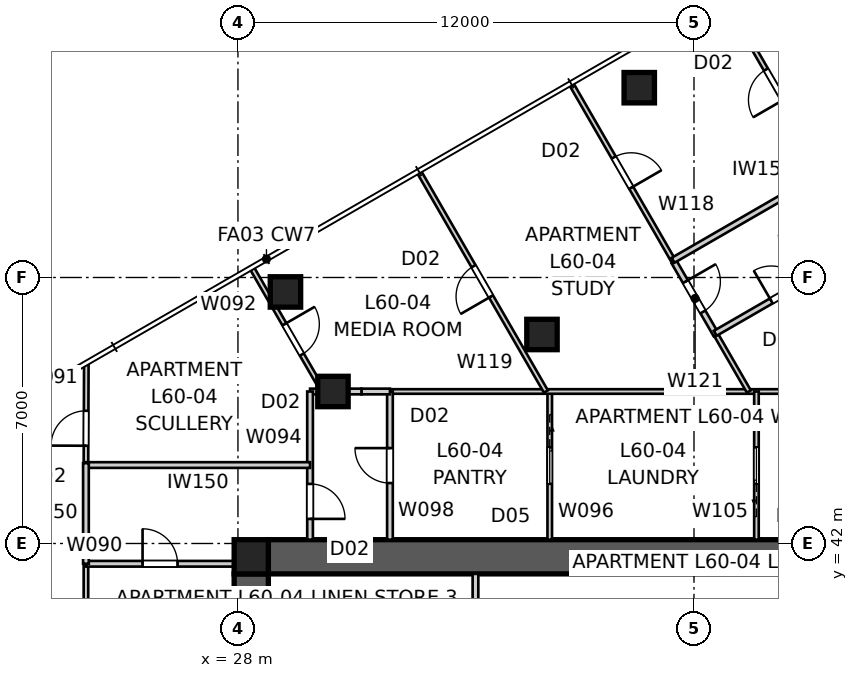
"""IFC4 building model, lengths in metres.
Left out: names, types, materials, properties, quantities, classifications, styles, units other than length and angle.
Written with IfcOpenShell. Run it as: python <this file> out.ifc"""

import sys

from ifc_helpers import new_model, si_unit, direction, frame, frame_2d, origin, origin_2d, place, context, subcontext, project, spatial, polyline, rectangle, outline, extrude, element, fill, save


model = new_model("IFC4")
c1 = context("Model", 3, precision=1e-05, world=origin(), true_north=direction((0.0, 1.0)))
c2 = subcontext(c1, "Body", "Model", "MODEL_VIEW")
j1 = project(units=[si_unit("LENGTHUNIT", "METRE"), si_unit("PLANEANGLEUNIT", "RADIAN")], contexts=[c1])
p1 = place(None, origin())
s1 = spatial("IfcSite", under=j1, at=p1, CompositionType="ELEMENT")
p2 = place(p1, origin())
s2 = spatial("IfcBuilding", under=s1, at=p2, CompositionType="ELEMENT")
p3 = place(p2, frame((0.0, 0.0, 218.4)))
s3 = spatial("IfcBuildingStorey", under=s2, at=p3, CompositionType="ELEMENT", Elevation=218.4)
p4 = place(p3, frame((28.8, 41.65, 0.0), z_axis=(0.0, 0.0, 1.0), x_axis=(1.0, 0.0, 0.0)))
e1 = element("IfcWall", 1, at=p4, inside=s3, PredefinedType="SHEAR", context=c2, shape_type="SweptSolid", body=[
    extrude(outline(polyline([(0.0, -0.45), (22.4, -0.45), (22.4, -0.025), (22.85, -0.025), (22.85, 0.025), (22.4, 0.025), (22.4, 0.45), (0.0, 0.45), (0.0, 0.025), (-0.45, 0.025), (-0.45, -0.025), (0.0, -0.025), (0.0, -0.45)])), origin(), (0.0, 0.0, 1.0), 3.4),
])
p5 = place(p3, frame((28.35, 41.2, 0.0), z_axis=(0.0, 0.0, 1.0), x_axis=(0.0, -1.0, 0.0)))
e2 = element("IfcWall", 2, at=p5, inside=s3, PredefinedType="SHEAR", context=c2, shape_type="SweptSolid", body=[
    extrude(outline(polyline([(0.0, -0.45), (22.4, -0.45), (22.4, -0.025), (22.85, -0.025), (22.85, 0.025), (22.4, 0.025), (22.4, 0.45), (0.0, 0.45), (0.0, 0.025), (-0.45, 0.025), (-0.45, -0.025), (0.0, -0.025), (0.0, -0.45)])), origin(), (0.0, 0.0, 1.0), 3.4),
])
p6 = place(p5, frame((11.14, 0.0, 0.0)))
e3 = element("IfcOpeningElement", 3, at=p6, cuts=e2, PredefinedType="OPENING", context=c2, shape_type="SweptSolid", body=[
    extrude(rectangle(XDim=1.02, YDim=2.4, at=frame_2d((0.51, 1.2))), frame((0.0, 0.46, 0.0), z_axis=(0.0, -1.0, 0.0), x_axis=(1.0, 0.0, 0.0)), (0.0, 0.0, 1.0), 0.92),
])
p7 = place(p3, frame((28.35, 41.65, 0.0), z_axis=(0.0, 0.0, 1.0), x_axis=(1.0, 0.0, 0.0)))
e4 = element("IfcColumn", 4, at=p7, inside=s3, PredefinedType="COLUMN", context=c2, shape_type="SweptSolid", body=[
    extrude(rectangle(XDim=0.9, YDim=0.9, at=origin_2d()), origin(), (0.0, 0.0, 1.0), 3.4),
])
for number, where, z_axis, x_axis in (
    (5, (38.56, 53.995, 0.0), (0.0, 0.0, 1.0), (1.0, 0.0, 0.0)),
    (6, (29.25, 48.62, 0.0), (0.0, 0.0, 1.0), (1.0, 0.0, 0.0)),
    (7, (36.0, 47.5, 0.0), (0.0, 0.0, 1.0), (1.0, 0.0, 0.0)),
    (8, (30.5, 46.0, 0.0), (0.0, 0.0, 1.0), (1.0, 0.0, 0.0)),
):
    element("IfcColumn", number, at=place(p3, frame(where, z_axis=z_axis, x_axis=x_axis)), inside=s3, PredefinedType="COLUMN", context=c2, shape_type="SweptSolid", body=[
        extrude(rectangle(XDim=0.8, YDim=0.8, at=origin_2d()), origin(), (0.0, 0.0, 1.0), 3.4),
    ])
p8 = place(p3, frame((34.25, 41.2, 0.0), z_axis=(0.0, 0.0, 1.0), x_axis=(0.0, -1.0, 0.0)))
e9 = element("IfcWall", 9, at=p8, inside=s3, PredefinedType="SOLIDWALL", context=c2, shape_type="SweptSolid", body=[
    extrude(rectangle(XDim=5.95, YDim=0.15, at=frame_2d((2.975, 0.0))), origin(), (0.0, 0.0, 1.0), 3.25),
])
p9 = place(p8, frame((2.515, 0.0, 0.0)))
e10 = element("IfcOpeningElement", 10, at=p9, cuts=e9, PredefinedType="OPENING", context=c2, shape_type="SweptSolid", body=[
    extrude(rectangle(XDim=0.92, YDim=2.1, at=frame_2d((0.46, 1.05))), frame((0.0, 0.085, 0.0), z_axis=(0.0, -1.0, 0.0), x_axis=(1.0, 0.0, 0.0)), (0.0, 0.0, 1.0), 0.17),
])
p10 = place(p3, frame((24.0, 15.422, 0.0), z_axis=(0.0, 0.0, 1.0), x_axis=(0.0, 1.0, 0.0)))
e11 = element("IfcWall", 11, at=p10, inside=s3, PredefinedType="PARTITIONING", context=c2, shape_type="SweptSolid", body=[
    extrude(rectangle(XDim=26.045, YDim=0.12, at=frame_2d((13.022, 0.0))), origin(), (0.0, 0.0, 1.0), 2.55),
])
p11 = place(p10, frame((13.139, 0.0, 0.0)))
e12 = element("IfcOpeningElement", 12, at=p11, cuts=e11, PredefinedType="OPENING", context=c2, shape_type="SweptSolid", body=[
    extrude(rectangle(XDim=0.92, YDim=2.34, at=frame_2d((0.46, 1.17))), frame((0.0, 0.07, 0.0), z_axis=(0.0, -1.0, 0.0), x_axis=(1.0, 0.0, 0.0)), (0.0, 0.0, 1.0), 0.14),
])
p12 = place(p10, frame((20.573, 0.0, 0.0)))
e13 = element("IfcOpeningElement", 13, at=p12, cuts=e11, PredefinedType="OPENING", context=c2, shape_type="SweptSolid", body=[
    extrude(rectangle(XDim=0.92, YDim=2.34, at=frame_2d((0.46, 1.17))), frame((0.0, 0.07, 0.0), z_axis=(0.0, -1.0, 0.0), x_axis=(1.0, 0.0, 0.0)), (0.0, 0.0, 1.0), 0.14),
])
p13 = place(p10, frame((0.42, 0.0, 0.0)))
e14 = element("IfcOpeningElement", 14, at=p13, cuts=e11, PredefinedType="OPENING", context=c2, shape_type="SweptSolid", body=[
    extrude(rectangle(XDim=0.92, YDim=2.34, at=frame_2d((0.46, 1.17))), frame((0.0, 0.07, 0.0), z_axis=(0.0, -1.0, 0.0), x_axis=(1.0, 0.0, 0.0)), (0.0, 0.0, 1.0), 0.14),
])
p14 = place(p3, frame((24.0, 41.467, 0.0), z_axis=(0.0, 0.0, 1.0), x_axis=(1.0, 0.0, 0.0)))
e15 = element("IfcWall", 15, at=p14, inside=s3, PredefinedType="SOLIDWALL", context=c2, shape_type="SweptSolid", body=[
    extrude(rectangle(XDim=4.82, YDim=0.15, at=frame_2d((2.41, 0.0))), origin(), (0.0, 0.0, 1.0), 3.25),
])
p15 = place(p14, frame((1.49, 0.0, 0.0)))
e16 = element("IfcOpeningElement", 16, at=p15, cuts=e15, PredefinedType="OPENING", context=c2, shape_type="SweptSolid", body=[
    extrude(rectangle(XDim=0.92, YDim=2.1, at=frame_2d((0.46, 1.05))), frame((0.0, 0.085, 0.0), z_axis=(0.0, -1.0, 0.0), x_axis=(1.0, 0.0, 0.0)), (0.0, 0.0, 1.0), 0.17),
])
p16 = place(p3, frame((24.0, 44.115, 0.0), z_axis=(0.0, 0.0, 1.0), x_axis=(0.003773202081, 0.999992881448, 0.0)))
e17 = element("IfcWall", 17, at=p16, inside=s3, PredefinedType="PARTITIONING", context=c2, shape_type="SweptSolid", body=[
    extrude(rectangle(XDim=2.588, YDim=0.12, at=frame_2d((1.294, 0.0))), origin(), (0.0, 0.0, 1.0), 3.25),
])
p17 = place(p16, frame((0.458, 0.0, 0.0)))
e18 = element("IfcOpeningElement", 18, at=p17, cuts=e17, PredefinedType="OPENING", context=c2, shape_type="SweptSolid", body=[
    extrude(rectangle(XDim=0.92, YDim=2.34, at=frame_2d((0.46, 1.17))), frame((0.0, 0.07, 0.0), z_axis=(0.0, -1.0, 0.0), x_axis=(1.0, 0.0, 0.0)), (0.0, 0.0, 1.0), 0.14),
])
p18 = place(p3, frame((28.38, 49.226, 0.0), z_axis=(0.0, 0.0, 1.0), x_axis=(0.499973989716, -0.866040420308, 0.0)))
e19 = element("IfcWall", 19, at=p18, inside=s3, PredefinedType="PARTITIONING", context=c2, shape_type="SweptSolid", body=[
    extrude(rectangle(XDim=3.725, YDim=0.12, at=frame_2d((1.862, 0.0))), origin(), (0.0, 0.0, 1.0), 3.25),
])
p19 = place(p18, frame((1.682, 0.0, 0.0)))
e20 = element("IfcOpeningElement", 20, at=p19, cuts=e19, PredefinedType="OPENING", context=c2, shape_type="SweptSolid", body=[
    extrude(rectangle(XDim=0.92, YDim=2.34, at=frame_2d((0.46, 1.17))), frame((0.0, 0.07, 0.0), z_axis=(0.0, -1.0, 0.0), x_axis=(1.0, 0.0, 0.0)), (0.0, 0.0, 1.0), 0.14),
])
p20 = place(p3, frame((30.633, 46.0, 0.0), z_axis=(0.0, 0.0, 1.0), x_axis=(-1.0, 0.0, 0.0)))
e21 = element("IfcWall", 21, at=p20, inside=s3, PredefinedType="SOLIDWALL", context=c2, shape_type="SweptSolid", body=[
    extrude(rectangle(XDim=0.735, YDim=0.15, at=frame_2d((0.368, 0.0))), origin(), (0.0, 0.0, 1.0), 3.25),
])
p21 = place(p3, frame((29.897, 46.0, 0.0), z_axis=(0.0, 0.0, 1.0), x_axis=(0.0, -1.0, 0.0)))
e22 = element("IfcWall", 22, at=p21, inside=s3, PredefinedType="SOLIDWALL", context=c2, shape_type="SweptSolid", body=[
    extrude(rectangle(XDim=3.9, YDim=0.15, at=frame_2d((1.95, 0.0))), origin(), (0.0, 0.0, 1.0), 3.25),
])
p22 = place(p21, frame((2.433, 0.0, 0.0)))
e23 = element("IfcOpeningElement", 23, at=p22, cuts=e22, PredefinedType="OPENING", context=c2, shape_type="SweptSolid", body=[
    extrude(rectangle(XDim=0.92, YDim=2.34, at=frame_2d((0.46, 1.17))), frame((0.0, 0.085, 0.0), z_axis=(0.0, -1.0, 0.0), x_axis=(1.0, 0.0, 0.0)), (0.0, 0.0, 1.0), 0.17),
])
p23 = place(p3, frame((29.897, 44.065, 0.0), z_axis=(0.0, 0.0, 1.0), x_axis=(-1.0, 0.0, 0.0)))
e24 = element("IfcWall", 24, at=p23, inside=s3, PredefinedType="SOLIDWALL", context=c2, shape_type="SweptSolid", body=[
    extrude(rectangle(XDim=5.897, YDim=0.15, at=frame_2d((2.949, 0.0))), origin(), (0.0, 0.0, 1.0), 3.25),
])
p24 = place(p3, frame((36.204, 46.0, 0.0), z_axis=(0.0, 0.0, 1.0), x_axis=(0.0, -1.0, 0.0)))
e25 = element("IfcWall", 25, at=p24, inside=s3, PredefinedType="PARTITIONING", context=c2, shape_type="SweptSolid", body=[
    extrude(rectangle(XDim=3.9, YDim=0.12, at=frame_2d((1.95, 0.0))), origin(), (0.0, 0.0, 1.0), 3.25),
])
p25 = place(p24, frame((1.47, 0.0, 0.0)))
e26 = element("IfcOpeningElement", 26, at=p25, cuts=e25, PredefinedType="OPENING", context=c2, shape_type="SweptSolid", body=[
    extrude(rectangle(XDim=0.96, YDim=2.1, at=frame_2d((0.48, 1.05))), frame((0.0, 0.07, 0.0), z_axis=(0.0, -1.0, 0.0), x_axis=(1.0, 0.0, 0.0)), (0.0, 0.0, 1.0), 0.14),
])
p26 = place(p3, frame((32.0, 46.0, 0.0), z_axis=(0.0, 0.0, 1.0), x_axis=(1.0, 0.0, 0.0)))
e27 = element("IfcWall", 27, at=p26, inside=s3, PredefinedType="PARTITIONING", context=c2, shape_type="SweptSolid", body=[
    extrude(rectangle(XDim=17.213, YDim=0.12, at=frame_2d((8.607, 0.0))), origin(), (0.0, 0.0, 1.0), 3.25),
])
p27 = place(p3, frame((32.0, 42.1, 0.0), z_axis=(0.0, 0.0, 1.0), x_axis=(0.0, 1.0, 0.0)))
e28 = element("IfcWall", 28, at=p27, inside=s3, PredefinedType="SOLIDWALL", context=c2, shape_type="SweptSolid", body=[
    extrude(rectangle(XDim=3.9, YDim=0.15, at=frame_2d((1.95, 0.0))), origin(), (0.0, 0.0, 1.0), 3.25),
])
p28 = place(p27, frame((1.49, 0.0, 0.0)))
e29 = element("IfcOpeningElement", 29, at=p28, cuts=e28, PredefinedType="OPENING", context=c2, shape_type="SweptSolid", body=[
    extrude(rectangle(XDim=0.92, YDim=2.34, at=frame_2d((0.46, 1.17))), frame((0.0, 0.085, 0.0), z_axis=(0.0, -1.0, 0.0), x_axis=(1.0, 0.0, 0.0)), (0.0, 0.0, 1.0), 0.17),
])
p29 = place(p3, frame((41.644, 42.1, 0.0), z_axis=(0.0, 0.0, 1.0), x_axis=(0.0, 1.0, 0.0)))
e30 = element("IfcWall", 30, at=p29, inside=s3, PredefinedType="PARTITIONING", context=c2, shape_type="SweptSolid", body=[
    extrude(rectangle(XDim=3.9, YDim=0.12, at=frame_2d((1.95, 0.0))), origin(), (0.0, 0.0, 1.0), 3.25),
])
p30 = place(p29, frame((1.47, 0.0, 0.0)))
e31 = element("IfcOpeningElement", 31, at=p30, cuts=e30, PredefinedType="OPENING", context=c2, shape_type="SweptSolid", body=[
    extrude(rectangle(XDim=0.96, YDim=2.1, at=frame_2d((0.48, 1.05))), frame((0.0, 0.07, 0.0), z_axis=(0.0, -1.0, 0.0), x_axis=(1.0, 0.0, 0.0)), (0.0, 0.0, 1.0), 0.14),
])
p31 = place(p3, frame((24.0, 44.115, 0.0), z_axis=(0.0, 0.0, 1.0), x_axis=(0.0, -1.0, 0.0)))
e32 = element("IfcWall", 32, at=p31, inside=s3, PredefinedType="SOLIDWALL", context=c2, shape_type="SweptSolid", body=[
    extrude(rectangle(XDim=2.648, YDim=0.15, at=frame_2d((1.324, 0.0))), origin(), (0.0, 0.0, 1.0), 3.25),
])
p32 = place(p3, frame((43.48, 51.722, 0.0), z_axis=(0.0, 0.0, 1.0), x_axis=(-0.499989180974, 0.866031650062, 0.0)))
e33 = element("IfcWall", 33, at=p32, inside=s3, PredefinedType="PARTITIONING", context=c2, shape_type="SweptSolid", body=[
    extrude(rectangle(XDim=5.388, YDim=0.12, at=frame_2d((2.694, 0.0))), origin(), (0.0, 0.0, 1.0), 3.25),
])
p33 = place(p32, frame((2.254, 0.0, 0.0)))
e34 = element("IfcOpeningElement", 34, at=p33, cuts=e33, PredefinedType="OPENING", context=c2, shape_type="SweptSolid", body=[
    extrude(rectangle(XDim=0.92, YDim=2.34, at=frame_2d((0.46, 1.17))), frame((0.0, 0.07, 0.0), z_axis=(0.0, -1.0, 0.0), x_axis=(1.0, 0.0, 0.0)), (0.0, 0.0, 1.0), 0.14),
])
p34 = place(p3, frame((36.781, 54.076, 0.0), z_axis=(0.0, 0.0, 1.0), x_axis=(0.499989180974, -0.866031650062, 0.0)))
e35 = element("IfcWall", 35, at=p34, inside=s3, PredefinedType="PARTITIONING", context=c2, shape_type="SweptSolid", body=[
    extrude(rectangle(XDim=5.388, YDim=0.12, at=frame_2d((2.694, 0.0))), origin(), (0.0, 0.0, 1.0), 3.25),
])
p35 = place(p34, frame((2.214, 0.0, 0.0)))
e36 = element("IfcOpeningElement", 36, at=p35, cuts=e35, PredefinedType="OPENING", context=c2, shape_type="SweptSolid", body=[
    extrude(rectangle(XDim=0.92, YDim=2.34, at=frame_2d((0.46, 1.17))), frame((0.0, 0.07, 0.0), z_axis=(0.0, -1.0, 0.0), x_axis=(1.0, 0.0, 0.0)), (0.0, 0.0, 1.0), 0.14),
])
p36 = place(p3, frame((36.103, 46.0, 0.0), z_axis=(0.0, 0.0, 1.0), x_axis=(-0.500013541994, 0.866017585169, 0.0)))
e37 = element("IfcWall", 37, at=p36, inside=s3, PredefinedType="PARTITIONING", context=c2, shape_type="SweptSolid", body=[
    extrude(rectangle(XDim=6.655, YDim=0.12, at=frame_2d((3.328, 0.0))), origin(), (0.0, 0.0, 1.0), 3.25),
])
p37 = place(p36, frame((2.887, 0.0, 0.0)))
e38 = element("IfcOpeningElement", 38, at=p37, cuts=e37, PredefinedType="OPENING", context=c2, shape_type="SweptSolid", body=[
    extrude(rectangle(XDim=0.92, YDim=2.34, at=frame_2d((0.46, 1.17))), frame((0.0, 0.07, 0.0), z_axis=(0.0, -1.0, 0.0), x_axis=(1.0, 0.0, 0.0)), (0.0, 0.0, 1.0), 0.14),
])
p38 = place(p3, frame((40.584, 47.488, 0.0), z_axis=(0.0, 0.0, 1.0), x_axis=(0.500005339912, -0.866022320763, 0.0)))
e39 = element("IfcWall", 39, at=p38, inside=s3, PredefinedType="PARTITIONING", context=c2, shape_type="SweptSolid", body=[
    extrude(rectangle(XDim=1.718, YDim=0.12, at=frame_2d((0.859, 0.0))), origin(), (0.0, 0.0, 1.0), 3.25),
])
p39 = place(p3, frame((39.475, 49.41, 0.0), z_axis=(0.0, 0.0, 1.0), x_axis=(0.500008142102, -0.866020702889, 0.0)))
e40 = element("IfcWall", 40, at=p39, inside=s3, PredefinedType="SOLIDWALL", context=c2, shape_type="SweptSolid", body=[
    extrude(rectangle(XDim=2.219, YDim=0.15, at=frame_2d((1.11, 0.0))), origin(), (0.0, 0.0, 1.0), 3.25),
])
p40 = place(p39, frame((0.6, 0.0, 0.0)))
e41 = element("IfcOpeningElement", 41, at=p40, cuts=e40, PredefinedType="OPENING", context=c2, shape_type="SweptSolid", body=[
    extrude(rectangle(XDim=0.92, YDim=2.34, at=frame_2d((0.46, 1.17))), frame((0.0, 0.085, 0.0), z_axis=(0.0, -1.0, 0.0), x_axis=(1.0, 0.0, 0.0)), (0.0, 0.0, 1.0), 0.17),
])
p41 = place(p3, frame((43.455, 51.766, 0.0), z_axis=(0.0, 0.0, 1.0), x_axis=(-0.866025598446, -0.499999662836, 0.0)))
e42 = element("IfcWall", 42, at=p41, inside=s3, PredefinedType="SOLIDWALL", context=c2, shape_type="SweptSolid", body=[
    extrude(rectangle(XDim=4.625, YDim=0.15, at=frame_2d((2.312, 0.0))), origin(), (0.0, 0.0, 1.0), 3.25),
])
p42 = place(p3, frame((32.0, 46.0, 0.0), z_axis=(0.0, 0.0, 1.0), x_axis=(-1.0, 0.0, 0.0)))
e43 = element("IfcWall", 43, at=p42, inside=s3, PredefinedType="SOLIDWALL", context=c2, shape_type="SweptSolid", body=[
    extrude(rectangle(XDim=0.75, YDim=0.15, at=frame_2d((0.375, 0.0))), origin(), (0.0, 0.0, 1.0), 3.25),
])
p43 = place(p3, frame((31.25, 46.0, 0.0), z_axis=(0.0, 0.0, 1.0), x_axis=(-1.0, 0.0, 0.0)))
e44 = element("IfcWall", 44, at=p43, inside=s3, PredefinedType="SOLIDWALL", context=c2, shape_type="SweptSolid", body=[
    extrude(rectangle(XDim=0.545, YDim=0.15, at=frame_2d((0.273, 0.0))), origin(), (0.0, 0.0, 1.0), 2.55),
])
p44 = place(p3, frame((40.559, 47.531, 0.0), z_axis=(0.0, 0.0, 1.0), x_axis=(0.866025598446, 0.499999662836, 0.0)))
e45 = element("IfcWall", 45, at=p44, inside=s3, PredefinedType="SOLIDWALL", context=c2, shape_type="SweptSolid", body=[
    extrude(rectangle(XDim=4.625, YDim=0.15, at=frame_2d((2.312, 0.0))), origin(), (0.0, 0.0, 1.0), 3.25),
])
p45 = place(p44, frame((1.702, 0.0, 0.0)))
e46 = element("IfcOpeningElement", 46, at=p45, cuts=e45, PredefinedType="OPENING", context=c2, shape_type="SweptSolid", body=[
    extrude(rectangle(XDim=0.92, YDim=2.34, at=frame_2d((0.46, 1.17))), frame((0.0, 0.085, 0.0), z_axis=(0.0, -1.0, 0.0), x_axis=(1.0, 0.0, 0.0)), (0.0, 0.0, 1.0), 0.17),
])
p46 = place(p15, origin())
e47 = element("IfcDoor", 47, at=p46, inside=s3, OperationType="SINGLE_SWING_LEFT", PredefinedType="DOOR", context=c2, shape_type="SweptSolid", body=[
    extrude(rectangle(XDim=0.92, YDim=2.1, at=frame_2d((0.46, 1.05))), frame((0.0, 0.025, 0.0), z_axis=(0.0, -1.0, 0.0), x_axis=(1.0, 0.0, 0.0)), (0.0, 0.0, 1.0), 0.05),
])
fill(e16, e47)
p47 = place(p17, origin())
e48 = element("IfcDoor", 48, at=p47, inside=s3, OperationType="SINGLE_SWING_LEFT", PredefinedType="DOOR", context=c2, shape_type="SweptSolid", body=[
    extrude(rectangle(XDim=0.92, YDim=2.34, at=frame_2d((0.46, 1.17))), frame((0.0, 0.025, 0.0), z_axis=(0.0, -1.0, 0.0), x_axis=(1.0, 0.0, 0.0)), (0.0, 0.0, 1.0), 0.05),
])
fill(e18, e48)
p48 = place(p22, origin())
e49 = element("IfcDoor", 49, at=p48, inside=s3, OperationType="SINGLE_SWING_RIGHT", PredefinedType="DOOR", context=c2, shape_type="SweptSolid", body=[
    extrude(rectangle(XDim=0.92, YDim=2.34, at=frame_2d((0.46, 1.17))), frame((0.0, 0.025, 0.0), z_axis=(0.0, -1.0, 0.0), x_axis=(1.0, 0.0, 0.0)), (0.0, 0.0, 1.0), 0.05),
])
fill(e23, e49)
p49 = place(p19, origin())
e50 = element("IfcDoor", 50, at=p49, inside=s3, OperationType="SINGLE_SWING_LEFT", PredefinedType="DOOR", context=c2, shape_type="SweptSolid", body=[
    extrude(rectangle(XDim=0.92, YDim=2.34, at=frame_2d((0.46, 1.17))), frame((0.0, 0.025, 0.0), z_axis=(0.0, -1.0, 0.0), x_axis=(1.0, 0.0, 0.0)), (0.0, 0.0, 1.0), 0.05),
])
fill(e20, e50)
p50 = place(p28, origin())
e51 = element("IfcDoor", 51, at=p50, inside=s3, OperationType="SINGLE_SWING_RIGHT", PredefinedType="DOOR", context=c2, shape_type="SweptSolid", body=[
    extrude(rectangle(XDim=0.92, YDim=2.34, at=frame_2d((0.46, 1.17))), frame((0.0, 0.025, 0.0), z_axis=(0.0, -1.0, 0.0), x_axis=(1.0, 0.0, 0.0)), (0.0, 0.0, 1.0), 0.05),
])
fill(e29, e51)
p51 = place(p37, origin())
e52 = element("IfcDoor", 52, at=p51, inside=s3, OperationType="SINGLE_SWING_LEFT", PredefinedType="DOOR", context=c2, shape_type="SweptSolid", body=[
    extrude(rectangle(XDim=0.92, YDim=2.34, at=frame_2d((0.46, 1.17))), frame((0.0, 0.025, 0.0), z_axis=(0.0, -1.0, 0.0), x_axis=(1.0, 0.0, 0.0)), (0.0, 0.0, 1.0), 0.05),
])
fill(e38, e52)
p52 = place(p25, origin())
e53 = element("IfcDoor", 53, at=p52, inside=s3, OperationType="SLIDING_TO_LEFT", PredefinedType="DOOR", context=c2, shape_type="SweptSolid", body=[
    extrude(rectangle(XDim=0.96, YDim=2.1, at=frame_2d((0.48, 1.05))), frame((0.0, 0.025, 0.0), z_axis=(0.0, -1.0, 0.0), x_axis=(1.0, 0.0, 0.0)), (0.0, 0.0, 1.0), 0.05),
])
fill(e26, e53)
p53 = place(p35, origin())
e54 = element("IfcDoor", 54, at=p53, inside=s3, OperationType="SINGLE_SWING_RIGHT", PredefinedType="DOOR", context=c2, shape_type="SweptSolid", body=[
    extrude(rectangle(XDim=0.92, YDim=2.34, at=frame_2d((0.46, 1.17))), frame((0.0, 0.025, 0.0), z_axis=(0.0, -1.0, 0.0), x_axis=(1.0, 0.0, 0.0)), (0.0, 0.0, 1.0), 0.05),
])
fill(e36, e54)
p54 = place(p40, origin())
e55 = element("IfcDoor", 55, at=p54, inside=s3, OperationType="SINGLE_SWING_LEFT", PredefinedType="DOOR", context=c2, shape_type="SweptSolid", body=[
    extrude(rectangle(XDim=0.92, YDim=2.34, at=frame_2d((0.46, 1.17))), frame((0.0, 0.025, 0.0), z_axis=(0.0, -1.0, 0.0), x_axis=(1.0, 0.0, 0.0)), (0.0, 0.0, 1.0), 0.05),
])
fill(e41, e55)
p55 = place(p30, origin())
e56 = element("IfcDoor", 56, at=p55, inside=s3, OperationType="SLIDING_TO_LEFT", PredefinedType="DOOR", context=c2, shape_type="SweptSolid", body=[
    extrude(rectangle(XDim=0.96, YDim=2.1, at=frame_2d((0.48, 1.05))), frame((0.0, 0.025, 0.0), z_axis=(0.0, -1.0, 0.0), x_axis=(1.0, 0.0, 0.0)), (0.0, 0.0, 1.0), 0.05),
])
fill(e31, e56)
p56 = place(p33, origin())
e57 = element("IfcDoor", 57, at=p56, inside=s3, OperationType="SINGLE_SWING_LEFT", PredefinedType="DOOR", context=c2, shape_type="SweptSolid", body=[
    extrude(rectangle(XDim=0.92, YDim=2.34, at=frame_2d((0.46, 1.17))), frame((0.0, 0.025, 0.0), z_axis=(0.0, -1.0, 0.0), x_axis=(1.0, 0.0, 0.0)), (0.0, 0.0, 1.0), 0.05),
])
fill(e34, e57)
p57 = place(p45, origin())
e58 = element("IfcDoor", 58, at=p57, inside=s3, OperationType="SINGLE_SWING_LEFT", PredefinedType="DOOR", context=c2, shape_type="SweptSolid", body=[
    extrude(rectangle(XDim=0.92, YDim=2.34, at=frame_2d((0.46, 1.17))), frame((0.0, 0.025, 0.0), z_axis=(0.0, -1.0, 0.0), x_axis=(1.0, 0.0, 0.0)), (0.0, 0.0, 1.0), 0.05),
])
fill(e46, e58)
save(model, sys.argv[1])
